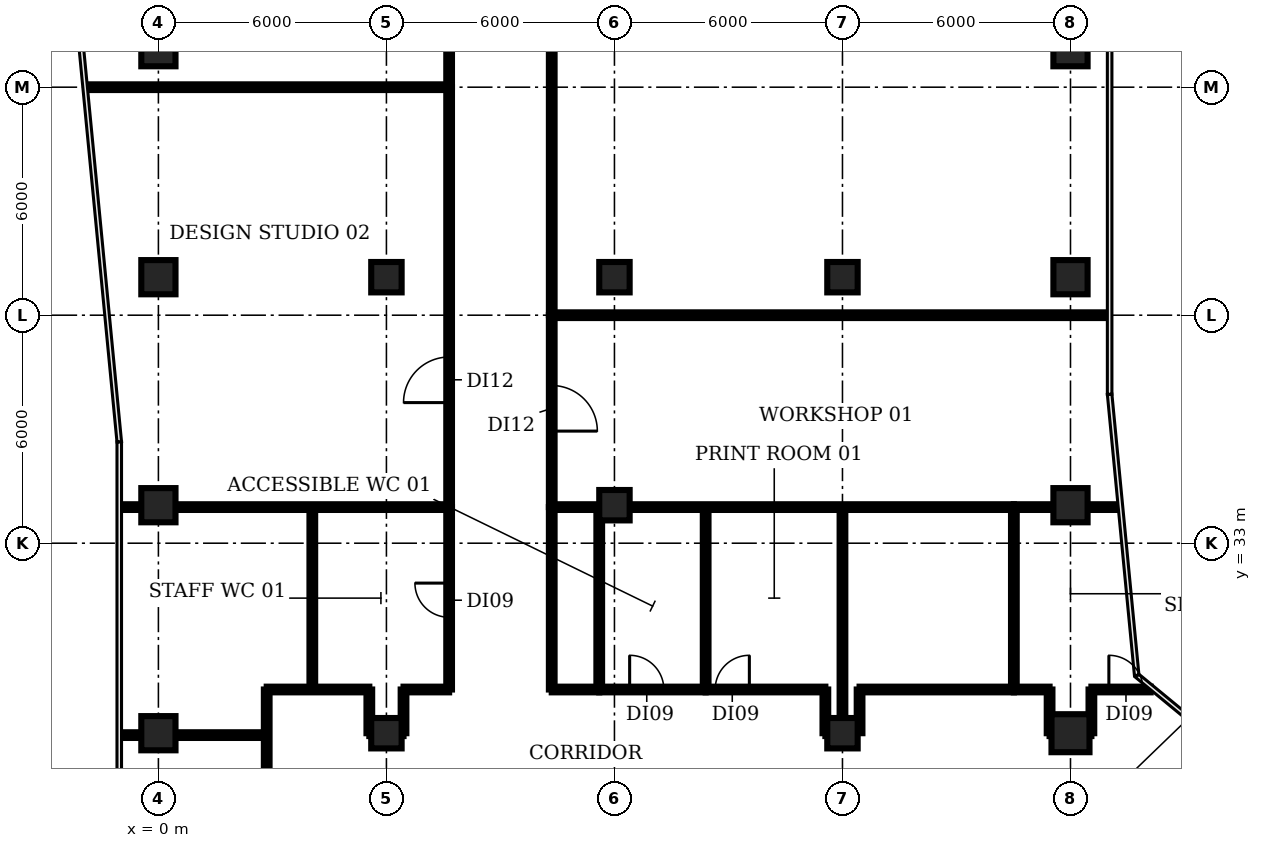
"""IFC4 building model, lengths in metres.
Left out: names, types, materials, properties, quantities, classifications, styles, units other than length and angle.
Written with IfcOpenShell. Run it as: python <this file> out.ifc"""

import sys

from ifc_helpers import new_model, si_unit, direction, frame, frame_2d, origin, origin_2d, place, context, subcontext, project, spatial, rectangle, circle, extrude, element, fill, save


model = new_model("IFC4")
c1 = context("Model", 3, precision=1e-05, world=origin(), true_north=direction((0.0, 1.0)))
c2 = subcontext(c1, "Body", "Model", "MODEL_VIEW")
j1 = project(units=[si_unit("LENGTHUNIT", "METRE"), si_unit("PLANEANGLEUNIT", "RADIAN")], contexts=[c1])
p1 = place(None, origin())
s1 = spatial("IfcSite", under=j1, at=p1, CompositionType="ELEMENT")
p2 = place(p1, origin())
s2 = spatial("IfcBuilding", under=s1, at=p2, CompositionType="ELEMENT")
p3 = place(p2, frame((0.0, 0.0, 205.4)))
s3 = spatial("IfcBuildingStorey", under=s2, at=p3, CompositionType="ELEMENT", Elevation=205.4)
for number, where, z_axis, x_axis in (
    (1, (0.0, 28.0, -0.35), (0.0, 0.0, 1.0), (1.0, 0.0, 0.0)),
    (2, (0.0, 34.0, -0.35), (0.0, 0.0, 1.0), (1.0, 0.0, 0.0)),
    (3, (0.0, 40.0, -0.35), (0.0, 0.0, 1.0), (1.0, 0.0, 0.0)),
    (4, (0.0, 46.0, -0.35), (0.0, 0.0, 1.0), (1.0, 0.0, 0.0)),
):
    element("IfcColumn", number, at=place(p3, frame(where, z_axis=z_axis, x_axis=x_axis)), inside=s3, PredefinedType="COLUMN", context=c2, shape_type="SweptSolid", body=[
        extrude(rectangle(XDim=0.9, YDim=0.9, at=origin_2d()), origin(), (0.0, 0.0, 1.0), 4.2),
    ])
for number, where, z_axis, x_axis in (
    (5, (6.0, 28.0, -0.35), (0.0, 0.0, 1.0), (1.0, 0.0, 0.0)),
    (6, (6.0, 40.0, -0.35), (0.0, 0.0, 1.0), (1.0, 0.0, 0.0)),
    (7, (12.0, 34.0, -0.35), (0.0, 0.0, 1.0), (1.0, 0.0, 0.0)),
    (8, (12.0, 40.0, -0.35), (0.0, 0.0, 1.0), (1.0, 0.0, 0.0)),
    (9, (18.0, 28.0, -0.35), (0.0, 0.0, 1.0), (1.0, 0.0, 0.0)),
    (10, (18.0, 40.0, -0.35), (0.0, 0.0, 1.0), (1.0, 0.0, 0.0)),
):
    element("IfcColumn", number, at=place(p3, frame(where, z_axis=z_axis, x_axis=x_axis)), inside=s3, PredefinedType="COLUMN", context=c2, shape_type="SweptSolid", body=[
        extrude(rectangle(XDim=0.8, YDim=0.8, at=origin_2d()), origin(), (0.0, 0.0, 1.0), 4.2),
    ])
p4 = place(p3, frame((24.0, 28.0, -0.35), z_axis=(0.0, 0.0, 1.0), x_axis=(1.0, 0.0, 0.0)))
e11 = element("IfcColumn", 11, at=p4, inside=s3, PredefinedType="COLUMN", context=c2, shape_type="SweptSolid", body=[
    extrude(circle(Radius=0.5, at=origin_2d()), origin(), (0.0, 0.0, 1.0), 4.2),
])
for number, where, z_axis, x_axis in (
    (12, (24.0, 34.0, -0.35), (0.0, 0.0, 1.0), (1.0, 0.0, 0.0)),
    (13, (24.0, 40.0, -0.35), (0.0, 0.0, 1.0), (1.0, 0.0, 0.0)),
    (14, (24.0, 46.0, -0.35), (0.0, 0.0, 1.0), (1.0, 0.0, 0.0)),
):
    element("IfcColumn", number, at=place(p3, frame(where, z_axis=z_axis, x_axis=x_axis)), inside=s3, PredefinedType="COLUMN", context=c2, shape_type="SweptSolid", body=[
        extrude(rectangle(XDim=0.9, YDim=0.9, at=origin_2d()), origin(), (0.0, 0.0, 1.0), 4.2),
    ])
p5 = place(p3, frame((-1.88, 45.0, 0.0), z_axis=(0.0, 0.0, 1.0), x_axis=(1.0, 0.0, 0.0)))
e15 = element("IfcWall", 15, at=p5, inside=s3, PredefinedType="PARTITIONING", context=c2, shape_type="SweptSolid", body=[
    extrude(rectangle(XDim=9.53, YDim=0.15, at=frame_2d((4.765, 0.0))), origin(), (0.0, 0.0, 1.0), 2.88),
])
p6 = place(p3, frame((-0.98, 27.95, 0.0), z_axis=(0.0, 0.0, 1.0), x_axis=(1.0, 0.0, 0.0)))
e16 = element("IfcWall", 16, at=p6, inside=s3, PredefinedType="PARTITIONING", context=c2, shape_type="SweptSolid", body=[
    extrude(rectangle(XDim=3.83, YDim=0.15, at=frame_2d((1.915, 0.0))), origin(), (0.0, 0.0, 1.0), 2.88),
])
p7 = place(p3, frame((-0.98, 33.95, 0.0), z_axis=(0.0, 0.0, 1.0), x_axis=(1.0, 0.0, 0.0)))
e17 = element("IfcWall", 17, at=p7, inside=s3, PredefinedType="PARTITIONING", context=c2, shape_type="SweptSolid", body=[
    extrude(rectangle(XDim=8.63, YDim=0.15, at=frame_2d((4.315, 0.0))), origin(), (0.0, 0.0, 1.0), 2.88),
])
p8 = place(p3, frame((2.85, 25.25, 0.0), z_axis=(0.0, 0.0, 1.0), x_axis=(0.0, 1.0, 0.0)))
e18 = element("IfcWall", 18, at=p8, inside=s3, PredefinedType="PARTITIONING", context=c2, shape_type="SweptSolid", body=[
    extrude(rectangle(XDim=3.9, YDim=0.15, at=frame_2d((1.95, 0.0))), origin(), (0.0, 0.0, 1.0), 2.88),
])
p9 = place(p3, frame((2.85, 29.15, 0.0), z_axis=(0.0, 0.0, 1.0), x_axis=(1.0, 0.0, 0.0)))
e19 = element("IfcWall", 19, at=p9, inside=s3, PredefinedType="PARTITIONING", context=c2, shape_type="SweptSolid", body=[
    extrude(rectangle(XDim=2.7, YDim=0.15, at=frame_2d((1.35, 0.0))), origin(), (0.0, 0.0, 1.0), 2.88),
])
p10 = place(p3, frame((4.05, 29.15, 0.0), z_axis=(0.0, 0.0, 1.0), x_axis=(0.0, 1.0, 0.0)))
e20 = element("IfcWall", 20, at=p10, inside=s3, PredefinedType="PARTITIONING", context=c2, shape_type="SweptSolid", body=[
    extrude(rectangle(XDim=4.8, YDim=0.15, at=frame_2d((2.4, 0.0))), origin(), (0.0, 0.0, 1.0), 2.88),
])
p11 = place(p3, frame((5.55, 28.0, 0.0), z_axis=(0.0, 0.0, 1.0), x_axis=(0.0, 1.0, 0.0)))
e21 = element("IfcWall", 21, at=p11, inside=s3, PredefinedType="PARTITIONING", context=c2, shape_type="SweptSolid", body=[
    extrude(rectangle(XDim=1.15, YDim=0.15, at=frame_2d((0.575, 0.0))), origin(), (0.0, 0.0, 1.0), 2.88),
])
p12 = place(p3, frame((5.55, 28.0, 0.0), z_axis=(0.0, 0.0, 1.0), x_axis=(1.0, 0.0, 0.0)))
e22 = element("IfcWall", 22, at=p12, inside=s3, PredefinedType="PARTITIONING", context=c2, shape_type="SweptSolid", body=[
    extrude(rectangle(XDim=0.9, YDim=0.15, at=frame_2d((0.45, 0.0))), origin(), (0.0, 0.0, 1.0), 2.88),
])
p13 = place(p3, frame((6.45, 28.0, 0.0), z_axis=(0.0, 0.0, 1.0), x_axis=(0.0, 1.0, 0.0)))
e23 = element("IfcWall", 23, at=p13, inside=s3, PredefinedType="PARTITIONING", context=c2, shape_type="SweptSolid", body=[
    extrude(rectangle(XDim=1.15, YDim=0.15, at=frame_2d((0.575, 0.0))), origin(), (0.0, 0.0, 1.0), 2.88),
])
p14 = place(p3, frame((6.45, 29.15, 0.0), z_axis=(0.0, 0.0, 1.0), x_axis=(1.0, 0.0, 0.0)))
e24 = element("IfcWall", 24, at=p14, inside=s3, PredefinedType="PARTITIONING", context=c2, shape_type="SweptSolid", body=[
    extrude(rectangle(XDim=1.2, YDim=0.15, at=frame_2d((0.6, 0.0))), origin(), (0.0, 0.0, 1.0), 2.88),
])
p15 = place(p3, frame((7.65, 29.15, 0.0), z_axis=(0.0, 0.0, 1.0), x_axis=(0.0, 1.0, 0.0)))
e25 = element("IfcWall", 25, at=p15, inside=s3, PredefinedType="PARTITIONING", context=c2, shape_type="SweptSolid", body=[
    extrude(rectangle(XDim=4.8, YDim=0.15, at=frame_2d((2.4, 0.0))), origin(), (0.0, 0.0, 1.0), 2.88),
])
p16 = place(p15, frame((1.9, 0.0, 0.0)))
e26 = element("IfcOpeningElement", 26, at=p16, cuts=e25, PredefinedType="OPENING", context=c2, shape_type="SweptSolid", body=[
    extrude(rectangle(XDim=0.9, YDim=2.1, at=frame_2d((0.45, 1.05))), frame((0.0, 0.085, 0.0), z_axis=(0.0, -1.0, 0.0), x_axis=(1.0, 0.0, 0.0)), (0.0, 0.0, 1.0), 0.17),
])
p17 = place(p3, frame((7.65, 33.95, 0.0), z_axis=(0.0, 0.0, 1.0), x_axis=(0.0, 1.0, 0.0)))
e27 = element("IfcWall", 27, at=p17, inside=s3, PredefinedType="PARTITIONING", context=c2, shape_type="SweptSolid", body=[
    extrude(rectangle(XDim=11.05, YDim=0.15, at=frame_2d((5.525, 0.0))), origin(), (0.0, 0.0, 1.0), 2.88),
])
p18 = place(p17, frame((2.75, 0.0, 0.0)))
e28 = element("IfcOpeningElement", 28, at=p18, cuts=e27, PredefinedType="OPENING", context=c2, shape_type="SweptSolid", body=[
    extrude(rectangle(XDim=1.2, YDim=2.1, at=frame_2d((0.6, 1.05))), frame((0.0, 0.085, 0.0), z_axis=(0.0, -1.0, 0.0), x_axis=(1.0, 0.0, 0.0)), (0.0, 0.0, 1.0), 0.17),
])
p19 = place(p3, frame((7.65, 45.0, 0.0), z_axis=(0.0, 0.0, 1.0), x_axis=(0.0, 1.0, 0.0)))
e29 = element("IfcWall", 29, at=p19, inside=s3, PredefinedType="PARTITIONING", context=c2, shape_type="SweptSolid", body=[
    extrude(rectangle(XDim=6.0, YDim=0.15, at=frame_2d((3.0, 0.0))), origin(), (0.0, 0.0, 1.0), 2.88),
])
p20 = place(p19, frame((2.4, 0.0, 0.0)))
e30 = element("IfcOpeningElement", 30, at=p20, cuts=e29, PredefinedType="OPENING", context=c2, shape_type="SweptSolid", body=[
    extrude(rectangle(XDim=1.0, YDim=2.1, at=frame_2d((0.5, 1.05))), frame((0.0, 0.085, 0.0), z_axis=(0.0, -1.0, 0.0), x_axis=(1.0, 0.0, 0.0)), (0.0, 0.0, 1.0), 0.17),
])
p21 = place(p3, frame((10.35, 29.15, 0.0), z_axis=(0.0, 0.0, 1.0), x_axis=(0.0, 1.0, 0.0)))
e31 = element("IfcWall", 31, at=p21, inside=s3, PredefinedType="PARTITIONING", context=c2, shape_type="SweptSolid", body=[
    extrude(rectangle(XDim=4.8, YDim=0.15, at=frame_2d((2.4, 0.0))), origin(), (0.0, 0.0, 1.0), 2.88),
])
p22 = place(p3, frame((10.35, 29.15, 0.0), z_axis=(0.0, 0.0, 1.0), x_axis=(1.0, 0.0, 0.0)))
e32 = element("IfcWall", 32, at=p22, inside=s3, PredefinedType="PARTITIONING", context=c2, shape_type="SweptSolid", body=[
    extrude(rectangle(XDim=1.25, YDim=0.15, at=frame_2d((0.625, 0.0))), origin(), (0.0, 0.0, 1.0), 2.88),
])
p23 = place(p3, frame((10.35, 33.95, 0.0), z_axis=(0.0, 0.0, 1.0), x_axis=(1.0, 0.0, 0.0)))
e33 = element("IfcWall", 33, at=p23, inside=s3, PredefinedType="PARTITIONING", context=c2, shape_type="SweptSolid", body=[
    extrude(rectangle(XDim=12.16, YDim=0.15, at=frame_2d((6.08, 0.0))), origin(), (0.0, 0.0, 1.0), 2.88),
])
p24 = place(p3, frame((10.35, 39.0, 0.0), z_axis=(0.0, 0.0, 1.0), x_axis=(0.0, -1.0, 0.0)))
e34 = element("IfcWall", 34, at=p24, inside=s3, PredefinedType="PARTITIONING", context=c2, shape_type="SweptSolid", body=[
    extrude(rectangle(XDim=5.05, YDim=0.15, at=frame_2d((2.525, 0.0))), origin(), (0.0, 0.0, 1.0), 2.88),
])
p25 = place(p24, frame((1.85, 0.0, 0.0)))
e35 = element("IfcOpeningElement", 35, at=p25, cuts=e34, PredefinedType="OPENING", context=c2, shape_type="SweptSolid", body=[
    extrude(rectangle(XDim=1.2, YDim=2.1, at=frame_2d((0.6, 1.05))), frame((0.0, 0.085, 0.0), z_axis=(0.0, -1.0, 0.0), x_axis=(1.0, 0.0, 0.0)), (0.0, 0.0, 1.0), 0.17),
])
p26 = place(p3, frame((10.35, 39.0, 0.0), z_axis=(0.0, 0.0, 1.0), x_axis=(0.0, 1.0, 0.0)))
e36 = element("IfcWall", 36, at=p26, inside=s3, PredefinedType="PARTITIONING", context=c2, shape_type="SweptSolid", body=[
    extrude(rectangle(XDim=18.0, YDim=0.15, at=frame_2d((9.0, 0.0))), origin(), (0.0, 0.0, 1.0), 2.88),
])
p27 = place(p26, frame((8.0, 0.0, 0.0)))
e37 = element("IfcOpeningElement", 37, at=p27, cuts=e36, PredefinedType="OPENING", context=c2, shape_type="SweptSolid", body=[
    extrude(rectangle(XDim=1.8, YDim=2.1, at=frame_2d((0.9, 1.05))), frame((0.0, 0.085, 0.0), z_axis=(0.0, -1.0, 0.0), x_axis=(1.0, 0.0, 0.0)), (0.0, 0.0, 1.0), 0.17),
])
p28 = place(p3, frame((10.35, 39.0, 0.0), z_axis=(0.0, 0.0, 1.0), x_axis=(1.0, 0.0, 0.0)))
e38 = element("IfcWall", 38, at=p28, inside=s3, PredefinedType="PARTITIONING", context=c2, shape_type="SweptSolid", body=[
    extrude(rectangle(XDim=14.63, YDim=0.15, at=frame_2d((7.315, 0.0))), origin(), (0.0, 0.0, 1.0), 2.88),
])
p29 = place(p3, frame((11.6, 29.15, 0.0), z_axis=(0.0, 0.0, 1.0), x_axis=(0.0, 1.0, 0.0)))
e39 = element("IfcWall", 39, at=p29, inside=s3, PredefinedType="PARTITIONING", context=c2, shape_type="SweptSolid", body=[
    extrude(rectangle(XDim=4.6, YDim=0.15, at=frame_2d((2.3, 0.0))), origin(), (0.0, 0.0, 1.0), 2.88),
])
p30 = place(p3, frame((11.6, 29.15, 0.0), z_axis=(0.0, 0.0, 1.0), x_axis=(1.0, 0.0, 0.0)))
e40 = element("IfcWall", 40, at=p30, inside=s3, PredefinedType="PARTITIONING", context=c2, shape_type="SweptSolid", body=[
    extrude(rectangle(XDim=2.8, YDim=0.15, at=frame_2d((1.4, 0.0))), origin(), (0.0, 0.0, 1.0), 2.88),
])
p31 = place(p30, frame((0.8, 0.0, 0.0)))
e41 = element("IfcOpeningElement", 41, at=p31, cuts=e40, PredefinedType="OPENING", context=c2, shape_type="SweptSolid", body=[
    extrude(rectangle(XDim=0.9, YDim=2.1, at=frame_2d((0.45, 1.05))), frame((0.0, 0.085, 0.0), z_axis=(0.0, -1.0, 0.0), x_axis=(1.0, 0.0, 0.0)), (0.0, 0.0, 1.0), 0.17),
])
p32 = place(p3, frame((14.4, 29.15, 0.0), z_axis=(0.0, 0.0, 1.0), x_axis=(0.0, 1.0, 0.0)))
e42 = element("IfcWall", 42, at=p32, inside=s3, PredefinedType="PARTITIONING", context=c2, shape_type="SweptSolid", body=[
    extrude(rectangle(XDim=4.8, YDim=0.15, at=frame_2d((2.4, 0.0))), origin(), (0.0, 0.0, 1.0), 2.88),
])
p33 = place(p3, frame((14.4, 29.15, 0.0), z_axis=(0.0, 0.0, 1.0), x_axis=(1.0, 0.0, 0.0)))
e43 = element("IfcWall", 43, at=p33, inside=s3, PredefinedType="PARTITIONING", context=c2, shape_type="SweptSolid", body=[
    extrude(rectangle(XDim=3.15, YDim=0.15, at=frame_2d((1.575, 0.0))), origin(), (0.0, 0.0, 1.0), 2.88),
])
p34 = place(p33, frame((0.25, 0.0, 0.0)))
e44 = element("IfcOpeningElement", 44, at=p34, cuts=e43, PredefinedType="OPENING", context=c2, shape_type="SweptSolid", body=[
    extrude(rectangle(XDim=0.9, YDim=2.1, at=frame_2d((0.45, 1.05))), frame((0.0, 0.085, 0.0), z_axis=(0.0, -1.0, 0.0), x_axis=(1.0, 0.0, 0.0)), (0.0, 0.0, 1.0), 0.17),
])
p35 = place(p3, frame((17.55, 28.0, 0.0), z_axis=(0.0, 0.0, 1.0), x_axis=(0.0, 1.0, 0.0)))
e45 = element("IfcWall", 45, at=p35, inside=s3, PredefinedType="PARTITIONING", context=c2, shape_type="SweptSolid", body=[
    extrude(rectangle(XDim=1.15, YDim=0.15, at=frame_2d((0.575, 0.0))), origin(), (0.0, 0.0, 1.0), 2.88),
])
p36 = place(p3, frame((17.55, 28.0, 0.0), z_axis=(0.0, 0.0, 1.0), x_axis=(1.0, 0.0, 0.0)))
e46 = element("IfcWall", 46, at=p36, inside=s3, PredefinedType="PARTITIONING", context=c2, shape_type="SweptSolid", body=[
    extrude(rectangle(XDim=0.45, YDim=0.15, at=frame_2d((0.225, 0.0))), origin(), (0.0, 0.0, 1.0), 2.88),
])
p37 = place(p3, frame((18.0, 28.0, 0.0), z_axis=(0.0, 0.0, 1.0), x_axis=(0.0, 1.0, 0.0)))
e47 = element("IfcWall", 47, at=p37, inside=s3, PredefinedType="PARTITIONING", context=c2, shape_type="SweptSolid", body=[
    extrude(rectangle(XDim=5.95, YDim=0.15, at=frame_2d((2.975, 0.0))), origin(), (0.0, 0.0, 1.0), 2.88),
])
p38 = place(p3, frame((18.45, 28.0, 0.0), z_axis=(0.0, 0.0, 1.0), x_axis=(0.0, 1.0, 0.0)))
e48 = element("IfcWall", 48, at=p38, inside=s3, PredefinedType="PARTITIONING", context=c2, shape_type="SweptSolid", body=[
    extrude(rectangle(XDim=1.15, YDim=0.15, at=frame_2d((0.575, 0.0))), origin(), (0.0, 0.0, 1.0), 2.88),
])
p39 = place(p3, frame((18.45, 29.15, 0.0), z_axis=(0.0, 0.0, 1.0), x_axis=(1.0, 0.0, 0.0)))
e49 = element("IfcWall", 49, at=p39, inside=s3, PredefinedType="PARTITIONING", context=c2, shape_type="SweptSolid", body=[
    extrude(rectangle(XDim=4.06, YDim=0.15, at=frame_2d((2.03, 0.0))), origin(), (0.0, 0.0, 1.0), 2.88),
])
p40 = place(p3, frame((22.51, 29.15, 0.0), z_axis=(0.0, 0.0, 1.0), x_axis=(0.0, 1.0, 0.0)))
e50 = element("IfcWall", 50, at=p40, inside=s3, PredefinedType="PARTITIONING", context=c2, shape_type="SweptSolid", body=[
    extrude(rectangle(XDim=4.8, YDim=0.15, at=frame_2d((2.4, 0.0))), origin(), (0.0, 0.0, 1.0), 2.88),
])
p41 = place(p3, frame((22.51, 29.15, 0.0), z_axis=(0.0, 0.0, 1.0), x_axis=(1.0, 0.0, 0.0)))
e51 = element("IfcWall", 51, at=p41, inside=s3, PredefinedType="PARTITIONING", context=c2, shape_type="SweptSolid", body=[
    extrude(rectangle(XDim=0.94, YDim=0.15, at=frame_2d((0.47, 0.0))), origin(), (0.0, 0.0, 1.0), 2.88),
])
p42 = place(p3, frame((22.51, 33.95, 0.0), z_axis=(0.0, 0.0, 1.0), x_axis=(1.0, 0.0, 0.0)))
e52 = element("IfcWall", 52, at=p42, inside=s3, PredefinedType="PARTITIONING", context=c2, shape_type="SweptSolid", body=[
    extrude(rectangle(XDim=2.76, YDim=0.15, at=frame_2d((1.38, 0.0))), origin(), (0.0, 0.0, 1.0), 2.88),
])
p43 = place(p3, frame((23.45, 28.0, 0.0), z_axis=(0.0, 0.0, 1.0), x_axis=(0.0, 1.0, 0.0)))
e53 = element("IfcWall", 53, at=p43, inside=s3, PredefinedType="PARTITIONING", context=c2, shape_type="SweptSolid", body=[
    extrude(rectangle(XDim=1.15, YDim=0.15, at=frame_2d((0.575, 0.0))), origin(), (0.0, 0.0, 1.0), 2.88),
])
p44 = place(p3, frame((23.45, 28.0, 0.0), z_axis=(0.0, 0.0, 1.0), x_axis=(1.0, 0.0, 0.0)))
e54 = element("IfcWall", 54, at=p44, inside=s3, PredefinedType="PARTITIONING", context=c2, shape_type="SweptSolid", body=[
    extrude(rectangle(XDim=1.1, YDim=0.15, at=frame_2d((0.55, 0.0))), origin(), (0.0, 0.0, 1.0), 2.88),
])
p45 = place(p3, frame((24.55, 28.0, 0.0), z_axis=(0.0, 0.0, 1.0), x_axis=(0.0, 1.0, 0.0)))
e55 = element("IfcWall", 55, at=p45, inside=s3, PredefinedType="PARTITIONING", context=c2, shape_type="SweptSolid", body=[
    extrude(rectangle(XDim=1.15, YDim=0.15, at=frame_2d((0.575, 0.0))), origin(), (0.0, 0.0, 1.0), 2.88),
])
p46 = place(p3, frame((24.55, 29.15, 0.0), z_axis=(0.0, 0.0, 1.0), x_axis=(1.0, 0.0, 0.0)))
e56 = element("IfcWall", 56, at=p46, inside=s3, PredefinedType="PARTITIONING", context=c2, shape_type="SweptSolid", body=[
    extrude(rectangle(XDim=1.56, YDim=0.15, at=frame_2d((0.78, 0.0))), origin(), (0.0, 0.0, 1.0), 2.88),
])
p47 = place(p46, frame((0.46, 0.0, 0.0)))
e57 = element("IfcOpeningElement", 57, at=p47, cuts=e56, PredefinedType="OPENING", context=c2, shape_type="SweptSolid", body=[
    extrude(rectangle(XDim=0.9, YDim=2.1, at=frame_2d((0.45, 1.05))), frame((0.0, 0.085, 0.0), z_axis=(0.0, -1.0, 0.0), x_axis=(1.0, 0.0, 0.0)), (0.0, 0.0, 1.0), 0.17),
])
p48 = place(p16, origin())
e58 = element("IfcDoor", 58, at=p48, inside=s3, OperationType="SINGLE_SWING_RIGHT", PredefinedType="DOOR", context=c2, shape_type="SweptSolid", body=[
    extrude(rectangle(XDim=0.9, YDim=2.1, at=frame_2d((0.45, 1.05))), frame((0.0, 0.025, 0.0), z_axis=(0.0, -1.0, 0.0), x_axis=(1.0, 0.0, 0.0)), (0.0, 0.0, 1.0), 0.05),
])
fill(e26, e58)
p49 = place(p18, origin())
e59 = element("IfcDoor", 59, at=p49, inside=s3, OperationType="SINGLE_SWING_LEFT", PredefinedType="DOOR", context=c2, shape_type="SweptSolid", body=[
    extrude(rectangle(XDim=1.2, YDim=2.1, at=frame_2d((0.6, 1.05))), frame((0.0, 0.025, 0.0), z_axis=(0.0, -1.0, 0.0), x_axis=(1.0, 0.0, 0.0)), (0.0, 0.0, 1.0), 0.05),
])
fill(e28, e59)
p50 = place(p25, origin())
e60 = element("IfcDoor", 60, at=p50, inside=s3, OperationType="SINGLE_SWING_RIGHT", PredefinedType="DOOR", context=c2, shape_type="SweptSolid", body=[
    extrude(rectangle(XDim=1.2, YDim=2.1, at=frame_2d((0.6, 1.05))), frame((0.0, 0.025, 0.0), z_axis=(0.0, -1.0, 0.0), x_axis=(1.0, 0.0, 0.0)), (0.0, 0.0, 1.0), 0.05),
])
fill(e35, e60)
p51 = place(p31, origin())
e61 = element("IfcDoor", 61, at=p51, inside=s3, OperationType="SINGLE_SWING_LEFT", PredefinedType="DOOR", context=c2, shape_type="SweptSolid", body=[
    extrude(rectangle(XDim=0.9, YDim=2.1, at=frame_2d((0.45, 1.05))), frame((0.0, 0.025, 0.0), z_axis=(0.0, -1.0, 0.0), x_axis=(1.0, 0.0, 0.0)), (0.0, 0.0, 1.0), 0.05),
])
fill(e41, e61)
p52 = place(p34, origin())
e62 = element("IfcDoor", 62, at=p52, inside=s3, OperationType="SINGLE_SWING_RIGHT", PredefinedType="DOOR", context=c2, shape_type="SweptSolid", body=[
    extrude(rectangle(XDim=0.9, YDim=2.1, at=frame_2d((0.45, 1.05))), frame((0.0, 0.025, 0.0), z_axis=(0.0, -1.0, 0.0), x_axis=(1.0, 0.0, 0.0)), (0.0, 0.0, 1.0), 0.05),
])
fill(e44, e62)
p53 = place(p47, origin())
e63 = element("IfcDoor", 63, at=p53, inside=s3, OperationType="SINGLE_SWING_LEFT", PredefinedType="DOOR", context=c2, shape_type="SweptSolid", body=[
    extrude(rectangle(XDim=0.9, YDim=2.1, at=frame_2d((0.45, 1.05))), frame((0.0, 0.025, 0.0), z_axis=(0.0, -1.0, 0.0), x_axis=(1.0, 0.0, 0.0)), (0.0, 0.0, 1.0), 0.05),
])
fill(e57, e63)
save(model, sys.argv[1])
